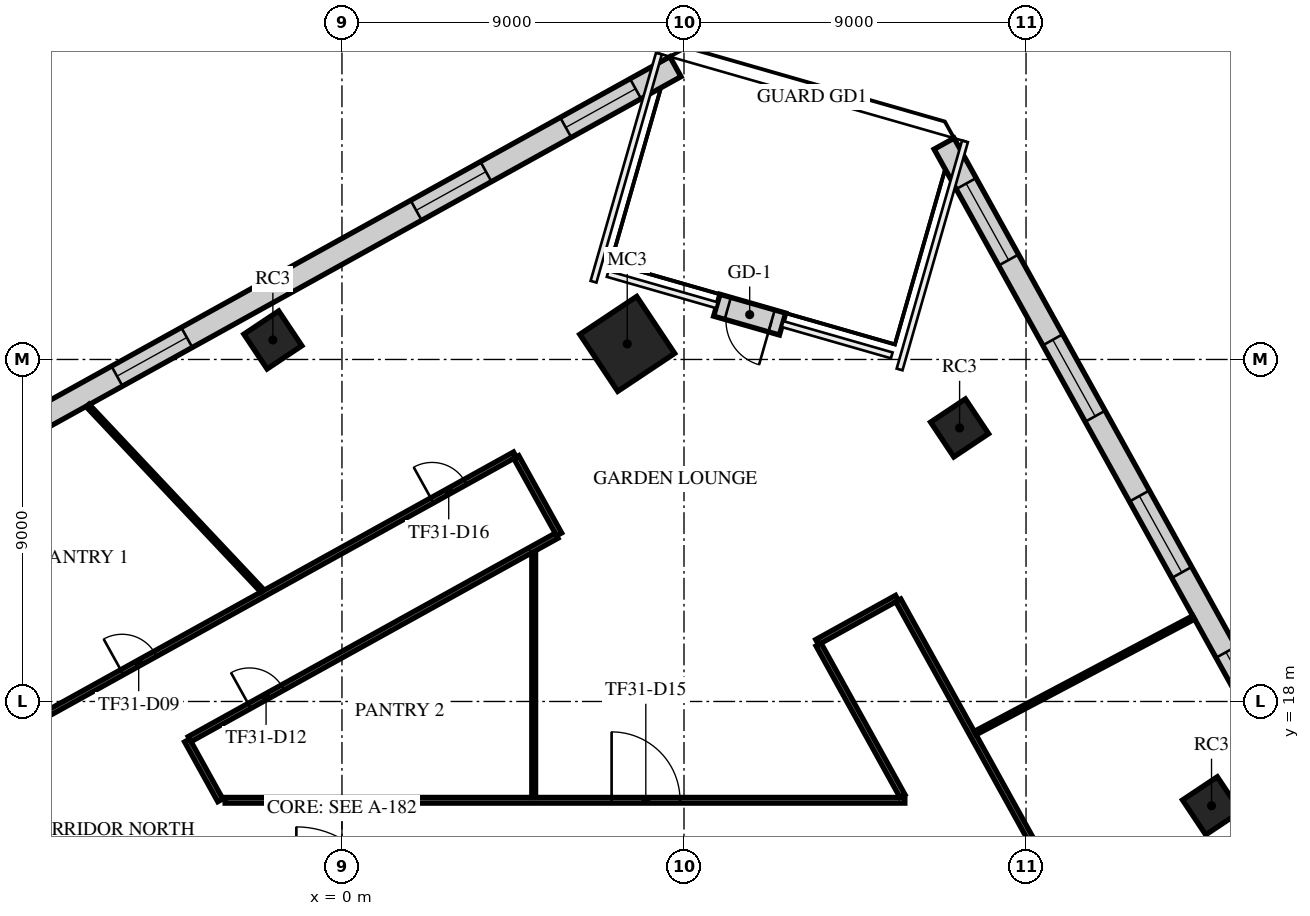
"""IFC4 building model, lengths in metres.
Left out: names, types, materials, properties, quantities, classifications, styles, units other than length and angle.
Written with IfcOpenShell. Run it as: python <this file> out.ifc"""

import sys

from ifc_helpers import new_model, si_unit, direction, frame, frame_2d, origin, origin_2d, place, context, subcontext, project, spatial, rectangle, extrude, element, fill, save


model = new_model("IFC4")
c1 = context("Model", 3, precision=1e-05, world=origin(), true_north=direction((0.0, 1.0)))
c2 = subcontext(c1, "Body", "Model", "MODEL_VIEW")
j1 = project(units=[si_unit("LENGTHUNIT", "METRE"), si_unit("PLANEANGLEUNIT", "RADIAN")], contexts=[c1])
p1 = place(None, origin())
s1 = spatial("IfcSite", under=j1, at=p1, CompositionType="ELEMENT")
p2 = place(p1, origin())
s2 = spatial("IfcBuilding", under=s1, at=p2, CompositionType="ELEMENT")
p3 = place(p2, frame((0.0, 0.0, 139.7)))
s3 = spatial("IfcBuildingStorey", under=s2, at=p3, CompositionType="ELEMENT", Elevation=139.7)
p4 = place(p3, frame((7.506, 27.41, 0.0), z_axis=(0.0, 0.0, 1.0), x_axis=(0.832028680356, 0.55473261583, 0.0)))
e1 = element("IfcColumn", 1, at=p4, inside=s3, PredefinedType="COLUMN", context=c2, shape_type="SweptSolid", body=[
    extrude(rectangle(XDim=1.8, YDim=1.8, at=origin_2d()), origin(), (0.0, 0.0, 1.0), 4.0),
])
for number, where, z_axis, x_axis in (
    (2, (-1.818, 27.513, 0.0), (0.0, 0.0, 1.0), (0.832, 0.555, 0.0)),
    (3, (22.881, 15.255, 0.0), (0.0, 0.0, 1.0), (0.832, 0.555, 0.0)),
    (4, (16.252, 25.198, 0.0), (0.0, 0.0, 1.0), (0.832, 0.555, 0.0)),
):
    element("IfcColumn", number, at=place(p3, frame(where, z_axis=z_axis, x_axis=x_axis)), inside=s3, PredefinedType="COLUMN", context=c2, shape_type="SweptSolid", body=[
        extrude(rectangle(XDim=1.1, YDim=1.1, at=origin_2d()), origin(), (0.0, 0.0, 1.0), 4.0),
    ])
p5 = place(p3, frame((8.775, 34.705, 0.0), z_axis=(0.0, 0.0, 1.0), x_axis=(-0.874620778241, -0.484807687922, 0.0)))
e5 = element("IfcWall", 5, at=p5, inside=s3, PredefinedType="STANDARD", context=c2, shape_type="SweptSolid", body=[
    extrude(rectangle(XDim=49.376, YDim=0.6, at=frame_2d((24.688, 0.0))), origin(), (0.0, 0.0, 1.0), 3.6),
])
p6 = place(p5, frame((1.2, 0.0, 0.9)))
e6 = element("IfcOpeningElement", 6, at=p6, cuts=e5, PredefinedType="OPENING", context=c2, shape_type="SweptSolid", body=[
    extrude(rectangle(XDim=2.1, YDim=2.1, at=frame_2d((1.05, 1.05))), frame((0.0, 0.31, 0.0), z_axis=(0.0, -1.0, 0.0), x_axis=(1.0, 0.0, 0.0)), (0.0, 0.0, 1.0), 0.62),
])
p7 = place(p5, frame((5.7, 0.0, 0.9)))
e7 = element("IfcOpeningElement", 7, at=p7, cuts=e5, PredefinedType="OPENING", context=c2, shape_type="SweptSolid", body=[
    extrude(rectangle(XDim=2.1, YDim=2.1, at=frame_2d((1.05, 1.05))), frame((0.0, 0.31, 0.0), z_axis=(0.0, -1.0, 0.0), x_axis=(1.0, 0.0, 0.0)), (0.0, 0.0, 1.0), 0.62),
])
p8 = place(p5, frame((14.7, 0.0, 0.9)))
e8 = element("IfcOpeningElement", 8, at=p8, cuts=e5, PredefinedType="OPENING", context=c2, shape_type="SweptSolid", body=[
    extrude(rectangle(XDim=2.1, YDim=2.1, at=frame_2d((1.05, 1.05))), frame((0.0, 0.31, 0.0), z_axis=(0.0, -1.0, 0.0), x_axis=(1.0, 0.0, 0.0)), (0.0, 0.0, 1.0), 0.62),
])
p9 = place(p5, frame((19.2, 0.0, 0.9)))
e9 = element("IfcOpeningElement", 9, at=p9, cuts=e5, PredefinedType="OPENING", context=c2, shape_type="SweptSolid", body=[
    extrude(rectangle(XDim=2.1, YDim=2.1, at=frame_2d((1.05, 1.05))), frame((0.0, 0.31, 0.0), z_axis=(0.0, -1.0, 0.0), x_axis=(1.0, 0.0, 0.0)), (0.0, 0.0, 1.0), 0.62),
])
p10 = place(p5, frame((23.7, 0.0, 0.9)))
e10 = element("IfcOpeningElement", 10, at=p10, cuts=e5, PredefinedType="OPENING", context=c2, shape_type="SweptSolid", body=[
    extrude(rectangle(XDim=2.1, YDim=2.1, at=frame_2d((1.05, 1.05))), frame((0.0, 0.31, 0.0), z_axis=(0.0, -1.0, 0.0), x_axis=(1.0, 0.0, 0.0)), (0.0, 0.0, 1.0), 0.62),
])
p11 = place(p5, frame((28.2, 0.0, 0.9)))
e11 = element("IfcOpeningElement", 11, at=p11, cuts=e5, PredefinedType="OPENING", context=c2, shape_type="SweptSolid", body=[
    extrude(rectangle(XDim=2.1, YDim=2.1, at=frame_2d((1.05, 1.05))), frame((0.0, 0.31, 0.0), z_axis=(0.0, -1.0, 0.0), x_axis=(1.0, 0.0, 0.0)), (0.0, 0.0, 1.0), 0.62),
])
p12 = place(p5, frame((32.7, 0.0, 0.9)))
e12 = element("IfcOpeningElement", 12, at=p12, cuts=e5, PredefinedType="OPENING", context=c2, shape_type="SweptSolid", body=[
    extrude(rectangle(XDim=2.1, YDim=2.1, at=frame_2d((1.05, 1.05))), frame((0.0, 0.31, 0.0), z_axis=(0.0, -1.0, 0.0), x_axis=(1.0, 0.0, 0.0)), (0.0, 0.0, 1.0), 0.62),
])
p13 = place(p5, frame((37.2, 0.0, 0.9)))
e13 = element("IfcOpeningElement", 13, at=p13, cuts=e5, PredefinedType="OPENING", context=c2, shape_type="SweptSolid", body=[
    extrude(rectangle(XDim=2.1, YDim=2.1, at=frame_2d((1.05, 1.05))), frame((0.0, 0.31, 0.0), z_axis=(0.0, -1.0, 0.0), x_axis=(1.0, 0.0, 0.0)), (0.0, 0.0, 1.0), 0.62),
])
p14 = place(p5, frame((41.7, 0.0, 0.9)))
e14 = element("IfcOpeningElement", 14, at=p14, cuts=e5, PredefinedType="OPENING", context=c2, shape_type="SweptSolid", body=[
    extrude(rectangle(XDim=2.1, YDim=2.1, at=frame_2d((1.05, 1.05))), frame((0.0, 0.31, 0.0), z_axis=(0.0, -1.0, 0.0), x_axis=(1.0, 0.0, 0.0)), (0.0, 0.0, 1.0), 0.62),
])
p15 = place(p5, frame((46.138, 0.0, 0.9)))
e15 = element("IfcOpeningElement", 15, at=p15, cuts=e5, PredefinedType="OPENING", context=c2, shape_type="SweptSolid", body=[
    extrude(rectangle(XDim=2.1, YDim=2.1, at=frame_2d((1.05, 1.05))), frame((0.0, 0.31, 0.0), z_axis=(0.0, -1.0, 0.0), x_axis=(1.0, 0.0, 0.0)), (0.0, 0.0, 1.0), 0.62),
])
p16 = place(p3, frame((36.291, -4.209, 0.0), z_axis=(0.0, 0.0, 1.0), x_axis=(-0.484811111615, 0.874618880458, 0.0)))
e16 = element("IfcWall", 16, at=p16, inside=s3, PredefinedType="STANDARD", context=c2, shape_type="SweptSolid", body=[
    extrude(rectangle(XDim=42.176, YDim=0.6, at=frame_2d((21.088, 0.0))), origin(), (0.0, 0.0, 1.0), 3.6),
])
p17 = place(p16, frame((1.138, 0.0, 0.9)))
e17 = element("IfcOpeningElement", 17, at=p17, cuts=e16, PredefinedType="OPENING", context=c2, shape_type="SweptSolid", body=[
    extrude(rectangle(XDim=2.3, YDim=2.1, at=frame_2d((1.15, 1.05))), frame((0.0, 0.31, 0.0), z_axis=(0.0, -1.0, 0.0), x_axis=(1.0, 0.0, 0.0)), (0.0, 0.0, 1.0), 0.62),
])
p18 = place(p16, frame((5.776, 0.0, 0.9)))
e18 = element("IfcOpeningElement", 18, at=p18, cuts=e16, PredefinedType="OPENING", context=c2, shape_type="SweptSolid", body=[
    extrude(rectangle(XDim=2.3, YDim=2.1, at=frame_2d((1.15, 1.05))), frame((0.0, 0.31, 0.0), z_axis=(0.0, -1.0, 0.0), x_axis=(1.0, 0.0, 0.0)), (0.0, 0.0, 1.0), 0.62),
])
p19 = place(p16, frame((15.176, 0.0, 0.9)))
e19 = element("IfcOpeningElement", 19, at=p19, cuts=e16, PredefinedType="OPENING", context=c2, shape_type="SweptSolid", body=[
    extrude(rectangle(XDim=2.3, YDim=2.1, at=frame_2d((1.15, 1.05))), frame((0.0, 0.31, 0.0), z_axis=(0.0, -1.0, 0.0), x_axis=(1.0, 0.0, 0.0)), (0.0, 0.0, 1.0), 0.62),
])
p20 = place(p16, frame((19.876, 0.0, 0.9)))
e20 = element("IfcOpeningElement", 20, at=p20, cuts=e16, PredefinedType="OPENING", context=c2, shape_type="SweptSolid", body=[
    extrude(rectangle(XDim=2.3, YDim=2.1, at=frame_2d((1.15, 1.05))), frame((0.0, 0.31, 0.0), z_axis=(0.0, -1.0, 0.0), x_axis=(1.0, 0.0, 0.0)), (0.0, 0.0, 1.0), 0.62),
])
p21 = place(p16, frame((24.576, 0.0, 0.9)))
e21 = element("IfcOpeningElement", 21, at=p21, cuts=e16, PredefinedType="OPENING", context=c2, shape_type="SweptSolid", body=[
    extrude(rectangle(XDim=2.3, YDim=2.1, at=frame_2d((1.15, 1.05))), frame((0.0, 0.31, 0.0), z_axis=(0.0, -1.0, 0.0), x_axis=(1.0, 0.0, 0.0)), (0.0, 0.0, 1.0), 0.62),
])
p22 = place(p16, frame((29.276, 0.0, 0.9)))
e22 = element("IfcOpeningElement", 22, at=p22, cuts=e16, PredefinedType="OPENING", context=c2, shape_type="SweptSolid", body=[
    extrude(rectangle(XDim=2.3, YDim=2.1, at=frame_2d((1.15, 1.05))), frame((0.0, 0.31, 0.0), z_axis=(0.0, -1.0, 0.0), x_axis=(1.0, 0.0, 0.0)), (0.0, 0.0, 1.0), 0.62),
])
p23 = place(p16, frame((33.976, 0.0, 0.9)))
e23 = element("IfcOpeningElement", 23, at=p23, cuts=e16, PredefinedType="OPENING", context=c2, shape_type="SweptSolid", body=[
    extrude(rectangle(XDim=2.3, YDim=2.1, at=frame_2d((1.15, 1.05))), frame((0.0, 0.31, 0.0), z_axis=(0.0, -1.0, 0.0), x_axis=(1.0, 0.0, 0.0)), (0.0, 0.0, 1.0), 0.62),
])
p24 = place(p16, frame((38.676, 0.0, 0.9)))
e24 = element("IfcOpeningElement", 24, at=p24, cuts=e16, PredefinedType="OPENING", context=c2, shape_type="SweptSolid", body=[
    extrude(rectangle(XDim=2.3, YDim=2.1, at=frame_2d((1.15, 1.05))), frame((0.0, 0.31, 0.0), z_axis=(0.0, -1.0, 0.0), x_axis=(1.0, 0.0, 0.0)), (0.0, 0.0, 1.0), 0.62),
])
p25 = place(p3, frame((11.594, 27.932, 0.0), z_axis=(0.0, 0.0, 1.0), x_axis=(-0.96127791106, 0.275580800688, 0.0)))
e25 = element("IfcWall", 25, at=p25, inside=s3, PredefinedType="STANDARD", context=c2, shape_type="SweptSolid", body=[
    extrude(rectangle(XDim=1.8, YDim=0.6, at=frame_2d((0.9, 0.0))), origin(), (0.0, 0.0, 1.0), 3.6),
])
p26 = place(p25, frame((0.3, 0.0, 0.0)))
e26 = element("IfcOpeningElement", 26, at=p26, cuts=e25, PredefinedType="OPENING", context=c2, shape_type="SweptSolid", body=[
    extrude(rectangle(XDim=1.2, YDim=2.4, at=frame_2d((0.6, 1.2))), frame((0.0, 0.31, 0.0), z_axis=(0.0, -1.0, 0.0), x_axis=(1.0, 0.0, 0.0)), (0.0, 0.0, 1.0), 0.62),
])
p27 = place(p3, frame((-23.187, 9.123, 0.0), z_axis=(0.0, 0.0, 1.0), x_axis=(0.874618419846, 0.484811942578, 0.0)))
e27 = element("IfcWall", 27, at=p27, inside=s3, PredefinedType="PARTITIONING", context=c2, shape_type="SweptSolid", body=[
    extrude(rectangle(XDim=31.713, YDim=0.15, at=frame_2d((15.857, 0.0))), origin(), (0.0, 0.0, 1.0), 3.15),
])
p28 = place(p27, frame((11.252, 0.0, 0.0)))
e28 = element("IfcOpeningElement", 28, at=p28, cuts=e27, PredefinedType="OPENING", context=c2, shape_type="SweptSolid", body=[
    extrude(rectangle(XDim=1.0, YDim=2.1, at=frame_2d((0.5, 1.05))), frame((0.0, 0.085, 0.0), z_axis=(0.0, -1.0, 0.0), x_axis=(1.0, 0.0, 0.0)), (0.0, 0.0, 1.0), 0.17),
])
p29 = place(p27, frame((19.896, 0.0, 0.0)))
e29 = element("IfcOpeningElement", 29, at=p29, cuts=e27, PredefinedType="OPENING", context=c2, shape_type="SweptSolid", body=[
    extrude(rectangle(XDim=1.0, YDim=2.1, at=frame_2d((0.5, 1.05))), frame((0.0, 0.085, 0.0), z_axis=(0.0, -1.0, 0.0), x_axis=(1.0, 0.0, 0.0)), (0.0, 0.0, 1.0), 0.17),
])
p30 = place(p27, frame((29.223, 0.0, 0.0)))
e30 = element("IfcOpeningElement", 30, at=p30, cuts=e27, PredefinedType="OPENING", context=c2, shape_type="SweptSolid", body=[
    extrude(rectangle(XDim=1.0, YDim=2.1, at=frame_2d((0.5, 1.05))), frame((0.0, 0.085, 0.0), z_axis=(0.0, -1.0, 0.0), x_axis=(1.0, 0.0, 0.0)), (0.0, 0.0, 1.0), 0.17),
])
p31 = place(p3, frame((-4.074, 16.973, 0.0), z_axis=(0.0, 0.0, 1.0), x_axis=(0.484870548803, -0.874585931114, 0.0)))
e31 = element("IfcWall", 31, at=p31, inside=s3, PredefinedType="PARTITIONING", context=c2, shape_type="SweptSolid", body=[
    extrude(rectangle(XDim=1.799, YDim=0.15, at=frame_2d((0.899, 0.0))), origin(), (0.0, 0.0, 1.0), 3.6),
])
p32 = place(p3, frame((-4.008, 17.01, 0.0), z_axis=(0.0, 0.0, 1.0), x_axis=(0.874611645774, 0.484824163049, 0.0)))
e32 = element("IfcWall", 32, at=p32, inside=s3, PredefinedType="PARTITIONING", context=c2, shape_type="SweptSolid", body=[
    extrude(rectangle(XDim=11.041, YDim=0.15, at=frame_2d((5.521, 0.0))), origin(), (0.0, 0.0, 1.0), 3.15),
])
p33 = place(p32, frame((1.8, 0.0, 0.0)))
e33 = element("IfcOpeningElement", 33, at=p33, cuts=e32, PredefinedType="OPENING", context=c2, shape_type="SweptSolid", body=[
    extrude(rectangle(XDim=1.0, YDim=2.1, at=frame_2d((0.5, 1.05))), frame((0.0, 0.085, 0.0), z_axis=(0.0, -1.0, 0.0), x_axis=(1.0, 0.0, 0.0)), (0.0, 0.0, 1.0), 0.17),
])
p34 = place(p3, frame((-3.075, 15.4, 0.0), z_axis=(0.0, 0.0, 1.0), x_axis=(1.0, 0.0, 0.0)))
e34 = element("IfcWall", 34, at=p34, inside=s3, PredefinedType="PARTITIONING", context=c2, shape_type="SweptSolid", body=[
    extrude(rectangle(XDim=17.886, YDim=0.15, at=frame_2d((8.943, 0.0))), origin(), (0.0, 0.0, 1.0), 3.15),
])
p35 = place(p34, frame((10.17, 0.0, 0.0)))
e35 = element("IfcOpeningElement", 35, at=p35, cuts=e34, PredefinedType="OPENING", context=c2, shape_type="SweptSolid", body=[
    extrude(rectangle(XDim=1.8, YDim=2.1, at=frame_2d((0.9, 1.05))), frame((0.0, 0.085, 0.0), z_axis=(0.0, -1.0, 0.0), x_axis=(1.0, 0.0, 0.0)), (0.0, 0.0, 1.0), 0.17),
])
p36 = place(p3, frame((4.586, 24.432, 0.0), z_axis=(0.0, 0.0, 1.0), x_axis=(0.484983092102, -0.874523527628, 0.0)))
e36 = element("IfcWall", 36, at=p36, inside=s3, PredefinedType="PARTITIONING", context=c2, shape_type="SweptSolid", body=[
    extrude(rectangle(XDim=2.325, YDim=0.15, at=frame_2d((1.163, 0.0))), origin(), (0.0, 0.0, 1.0), 3.6),
])
p37 = place(p3, frame((12.504, 19.563, 0.0), z_axis=(0.0, 0.0, 1.0), x_axis=(0.874703778473, 0.484657920522, 0.0)))
e37 = element("IfcWall", 37, at=p37, inside=s3, PredefinedType="PARTITIONING", context=c2, shape_type="SweptSolid", body=[
    extrude(rectangle(XDim=2.4, YDim=0.15, at=frame_2d((1.2, 0.0))), origin(), (0.0, 0.0, 1.0), 3.15),
])
p38 = place(p3, frame((12.54, 19.497, 0.0), z_axis=(0.0, 0.0, 1.0), x_axis=(0.48474201542, -0.874657177691, 0.0)))
e38 = element("IfcWall", 38, at=p38, inside=s3, PredefinedType="PARTITIONING", context=c2, shape_type="SweptSolid", body=[
    extrude(rectangle(XDim=4.557, YDim=0.15, at=frame_2d((2.279, 0.0))), origin(), (0.0, 0.0, 1.0), 3.15),
])
p39 = place(p3, frame((14.639, 20.66, 0.0), z_axis=(0.0, 0.0, 1.0), x_axis=(0.484803020703, -0.874623365294, 0.0)))
e39 = element("IfcWall", 39, at=p39, inside=s3, PredefinedType="PARTITIONING", context=c2, shape_type="SweptSolid", body=[
    extrude(rectangle(XDim=22.02, YDim=0.15, at=frame_2d((11.01, 0.0))), origin(), (0.0, 0.0, 1.0), 3.15),
])
p40 = place(p39, frame((10.083, 0.0, 0.0)))
e40 = element("IfcOpeningElement", 40, at=p40, cuts=e39, PredefinedType="OPENING", context=c2, shape_type="SweptSolid", body=[
    extrude(rectangle(XDim=1.0, YDim=2.1, at=frame_2d((0.5, 1.05))), frame((0.0, 0.085, 0.0), z_axis=(0.0, -1.0, 0.0), x_axis=(1.0, 0.0, 0.0)), (0.0, 0.0, 1.0), 0.17),
])
p41 = place(p3, frame((-6.691, 25.788, 0.0), z_axis=(0.0, 0.0, 1.0), x_axis=(0.685723912774, -0.727861741988, 0.0)))
e41 = element("IfcWall", 41, at=p41, inside=s3, PredefinedType="PARTITIONING", context=c2, shape_type="SweptSolid", body=[
    extrude(rectangle(XDim=6.698, YDim=0.1, at=frame_2d((3.349, 0.0))), origin(), (0.0, 0.0, 1.0), 3.15),
])
p42 = place(p3, frame((5.045, 15.475, 0.0), z_axis=(0.0, 0.0, 1.0), x_axis=(0.0, 1.0, 0.0)))
e42 = element("IfcWall", 42, at=p42, inside=s3, PredefinedType="PARTITIONING", context=c2, shape_type="SweptSolid", body=[
    extrude(rectangle(XDim=6.439, YDim=0.1, at=frame_2d((3.22, 0.0))), origin(), (0.0, 0.0, 1.0), 3.6),
])
p43 = place(p3, frame((16.662, 17.168, 0.0), z_axis=(0.0, 0.0, 1.0), x_axis=(0.883911173827, 0.467654826538, 0.0)))
e43 = element("IfcWall", 43, at=p43, inside=s3, PredefinedType="PARTITIONING", context=c2, shape_type="SweptSolid", body=[
    extrude(rectangle(XDim=6.503, YDim=0.1, at=frame_2d((3.251, 0.0))), origin(), (0.0, 0.0, 1.0), 3.15),
])
p44 = place(p6, origin())
e44 = element("IfcWindow", 44, at=p44, inside=s3, PartitioningType="SINGLE_PANEL", PredefinedType="WINDOW", context=c2, shape_type="SweptSolid", body=[
    extrude(rectangle(XDim=2.1, YDim=2.1, at=frame_2d((1.05, 1.05))), frame((0.0, 0.03, 0.0), z_axis=(0.0, -1.0, 0.0), x_axis=(1.0, 0.0, 0.0)), (0.0, 0.0, 1.0), 0.06),
])
fill(e6, e44)
p45 = place(p7, origin())
e45 = element("IfcWindow", 45, at=p45, inside=s3, PartitioningType="SINGLE_PANEL", PredefinedType="WINDOW", context=c2, shape_type="SweptSolid", body=[
    extrude(rectangle(XDim=2.1, YDim=2.1, at=frame_2d((1.05, 1.05))), frame((0.0, 0.03, 0.0), z_axis=(0.0, -1.0, 0.0), x_axis=(1.0, 0.0, 0.0)), (0.0, 0.0, 1.0), 0.06),
])
fill(e7, e45)
p46 = place(p8, origin())
e46 = element("IfcWindow", 46, at=p46, inside=s3, PartitioningType="SINGLE_PANEL", PredefinedType="WINDOW", context=c2, shape_type="SweptSolid", body=[
    extrude(rectangle(XDim=2.1, YDim=2.1, at=frame_2d((1.05, 1.05))), frame((0.0, 0.03, 0.0), z_axis=(0.0, -1.0, 0.0), x_axis=(1.0, 0.0, 0.0)), (0.0, 0.0, 1.0), 0.06),
])
fill(e8, e46)
p47 = place(p21, origin())
e47 = element("IfcWindow", 47, at=p47, inside=s3, PartitioningType="SINGLE_PANEL", PredefinedType="WINDOW", context=c2, shape_type="SweptSolid", body=[
    extrude(rectangle(XDim=2.3, YDim=2.1, at=frame_2d((1.15, 1.05))), frame((0.0, 0.03, 0.0), z_axis=(0.0, -1.0, 0.0), x_axis=(1.0, 0.0, 0.0)), (0.0, 0.0, 1.0), 0.06),
])
fill(e21, e47)
p48 = place(p22, origin())
e48 = element("IfcWindow", 48, at=p48, inside=s3, PartitioningType="SINGLE_PANEL", PredefinedType="WINDOW", context=c2, shape_type="SweptSolid", body=[
    extrude(rectangle(XDim=2.3, YDim=2.1, at=frame_2d((1.15, 1.05))), frame((0.0, 0.03, 0.0), z_axis=(0.0, -1.0, 0.0), x_axis=(1.0, 0.0, 0.0)), (0.0, 0.0, 1.0), 0.06),
])
fill(e22, e48)
p49 = place(p23, origin())
e49 = element("IfcWindow", 49, at=p49, inside=s3, PartitioningType="SINGLE_PANEL", PredefinedType="WINDOW", context=c2, shape_type="SweptSolid", body=[
    extrude(rectangle(XDim=2.3, YDim=2.1, at=frame_2d((1.15, 1.05))), frame((0.0, 0.03, 0.0), z_axis=(0.0, -1.0, 0.0), x_axis=(1.0, 0.0, 0.0)), (0.0, 0.0, 1.0), 0.06),
])
fill(e23, e49)
p50 = place(p24, origin())
e50 = element("IfcWindow", 50, at=p50, inside=s3, PartitioningType="SINGLE_PANEL", PredefinedType="WINDOW", context=c2, shape_type="SweptSolid", body=[
    extrude(rectangle(XDim=2.3, YDim=2.1, at=frame_2d((1.15, 1.05))), frame((0.0, 0.03, 0.0), z_axis=(0.0, -1.0, 0.0), x_axis=(1.0, 0.0, 0.0)), (0.0, 0.0, 1.0), 0.06),
])
fill(e24, e50)
p51 = place(p26, origin())
e51 = element("IfcDoor", 51, at=p51, inside=s3, OperationType="SINGLE_SWING_LEFT", PredefinedType="DOOR", context=c2, shape_type="SweptSolid", body=[
    extrude(rectangle(XDim=1.2, YDim=2.4, at=frame_2d((0.6, 1.2))), frame((0.0, 0.025, 0.0), z_axis=(0.0, -1.0, 0.0), x_axis=(1.0, 0.0, 0.0)), (0.0, 0.0, 1.0), 0.05),
])
fill(e26, e51)
p52 = place(p29, origin())
e52 = element("IfcDoor", 52, at=p52, inside=s3, OperationType="SINGLE_SWING_LEFT", PredefinedType="DOOR", context=c2, shape_type="SweptSolid", body=[
    extrude(rectangle(XDim=1.0, YDim=2.1, at=frame_2d((0.5, 1.05))), frame((0.0, 0.025, 0.0), z_axis=(0.0, -1.0, 0.0), x_axis=(1.0, 0.0, 0.0)), (0.0, 0.0, 1.0), 0.05),
])
fill(e29, e52)
p53 = place(p33, frame((1.0, 0.0, 0.0), z_axis=(0.0, 0.0, 1.0), x_axis=(-1.0, 0.0, 0.0)))
e53 = element("IfcDoor", 53, at=p53, inside=s3, OperationType="SINGLE_SWING_RIGHT", PredefinedType="DOOR", context=c2, shape_type="SweptSolid", body=[
    extrude(rectangle(XDim=1.0, YDim=2.1, at=frame_2d((0.5, 1.05))), frame((0.0, 0.025, 0.0), z_axis=(0.0, -1.0, 0.0), x_axis=(1.0, 0.0, 0.0)), (0.0, 0.0, 1.0), 0.05),
])
fill(e33, e53)
p54 = place(p35, origin())
e54 = element("IfcDoor", 54, at=p54, inside=s3, OperationType="DOUBLE_DOOR_SINGLE_SWING", PredefinedType="DOOR", context=c2, shape_type="SweptSolid", body=[
    extrude(rectangle(XDim=1.8, YDim=2.1, at=frame_2d((0.9, 1.05))), frame((0.0, 0.025, 0.0), z_axis=(0.0, -1.0, 0.0), x_axis=(1.0, 0.0, 0.0)), (0.0, 0.0, 1.0), 0.05),
])
fill(e35, e54)
p55 = place(p30, origin())
e55 = element("IfcDoor", 55, at=p55, inside=s3, OperationType="SINGLE_SWING_LEFT", PredefinedType="DOOR", context=c2, shape_type="SweptSolid", body=[
    extrude(rectangle(XDim=1.0, YDim=2.1, at=frame_2d((0.5, 1.05))), frame((0.0, 0.025, 0.0), z_axis=(0.0, -1.0, 0.0), x_axis=(1.0, 0.0, 0.0)), (0.0, 0.0, 1.0), 0.05),
])
fill(e30, e55)
save(model, sys.argv[1])
